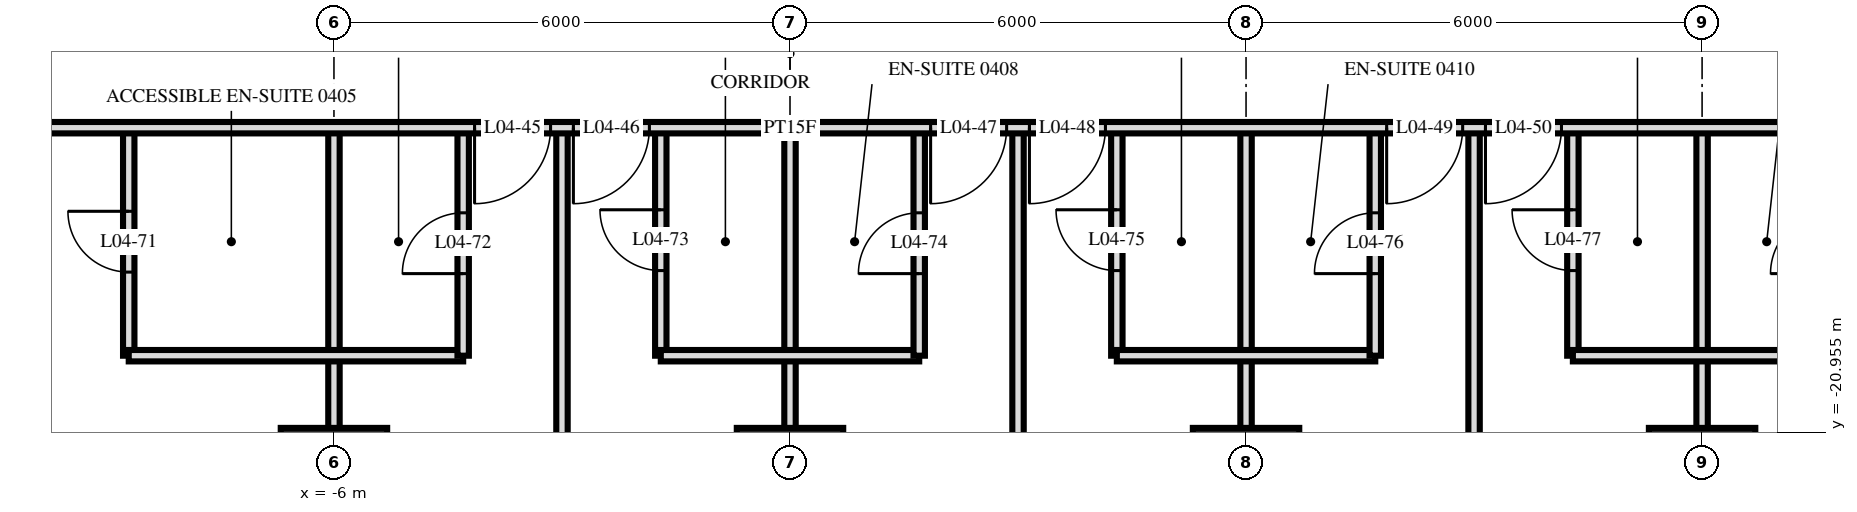
"""IFC4 building model, lengths in metres.
Left out: names, types, materials, properties, quantities, classifications, styles, units other than length and angle.
Written with IfcOpenShell. Run it as: python <this file> out.ifc"""

import sys

from ifc_helpers import new_model, si_unit, direction, frame, frame_2d, origin, origin_2d, place, context, subcontext, project, spatial, rectangle, extrude, element, fill, save


model = new_model("IFC4")
c1 = context("Model", 3, precision=1e-05, world=origin(), true_north=direction((0.0, 1.0)))
c2 = subcontext(c1, "Body", "Model", "MODEL_VIEW")
j1 = project(units=[si_unit("LENGTHUNIT", "METRE"), si_unit("PLANEANGLEUNIT", "RADIAN")], contexts=[c1])
p1 = place(None, origin())
s1 = spatial("IfcSite", under=j1, at=p1, CompositionType="ELEMENT")
p2 = place(p1, origin())
s2 = spatial("IfcBuilding", under=s1, at=p2, CompositionType="ELEMENT")
p3 = place(p2, frame((0.0, 0.0, 24.0)))
s3 = spatial("IfcBuildingStorey", under=s2, at=p3, CompositionType="ELEMENT", Elevation=24.0)
for number, where, z_axis, x_axis in (
    (1, (-6.0, -21.6, -0.28), (0.0, 0.0, 1.0), (1.0, 0.0, 0.0)),
    (2, (0.0, -21.6, -0.28), (0.0, 0.0, 1.0), (1.0, 0.0, 0.0)),
    (3, (6.0, -21.6, -0.28), (0.0, 0.0, 1.0), (1.0, 0.0, 0.0)),
    (4, (12.0, -21.6, -0.28), (0.0, 0.0, 1.0), (1.0, 0.0, 0.0)),
):
    element("IfcColumn", number, at=place(p3, frame(where, z_axis=z_axis, x_axis=x_axis)), inside=s3, PredefinedType="COLUMN", context=c2, shape_type="SweptSolid", body=[
        extrude(rectangle(XDim=1.4, YDim=1.4, at=origin_2d()), origin(), (0.0, 0.0, 1.0), 3.88),
    ])
p4 = place(p3, frame((12.0, -29.22, 0.0), z_axis=(0.0, 0.0, 1.0), x_axis=(0.0, 1.0, 0.0)))
e5 = element("IfcWall", 5, at=p4, inside=s3, PredefinedType="PARTITIONING", context=c2, shape_type="SweptSolid", body=[
    extrude(rectangle(XDim=12.27, YDim=0.15, at=frame_2d((6.135, 0.0))), origin(), (0.0, 0.0, 1.0), 3.32),
])
p5 = place(p3, frame((10.3, -19.95, 0.0), z_axis=(0.0, 0.0, 1.0), x_axis=(0.0, 1.0, 0.0)))
e6 = element("IfcWall", 6, at=p5, inside=s3, PredefinedType="PARTITIONING", context=c2, shape_type="SweptSolid", body=[
    extrude(rectangle(XDim=3.0, YDim=0.15, at=frame_2d((1.5, 0.0))), origin(), (0.0, 0.0, 1.0), 3.32),
])
p6 = place(p5, frame((1.12, 0.0, 0.0)))
e7 = element("IfcOpeningElement", 7, at=p6, cuts=e6, PredefinedType="OPENING", context=c2, shape_type="SweptSolid", body=[
    extrude(rectangle(XDim=0.8, YDim=2.1, at=frame_2d((0.4, 1.05))), frame((0.0, 0.085, 0.0), z_axis=(0.0, -1.0, 0.0), x_axis=(1.0, 0.0, 0.0)), (0.0, 0.0, 1.0), 0.17),
])
p7 = place(p3, frame((9.0, -29.22, 0.0), z_axis=(0.0, 0.0, 1.0), x_axis=(0.0, 1.0, 0.0)))
e8 = element("IfcWall", 8, at=p7, inside=s3, PredefinedType="PARTITIONING", context=c2, shape_type="SweptSolid", body=[
    extrude(rectangle(XDim=12.27, YDim=0.15, at=frame_2d((6.135, 0.0))), origin(), (0.0, 0.0, 1.0), 3.32),
])
p8 = place(p3, frame((7.7, -19.95, 0.0), z_axis=(0.0, 0.0, 1.0), x_axis=(0.0, 1.0, 0.0)))
e9 = element("IfcWall", 9, at=p8, inside=s3, PredefinedType="PARTITIONING", context=c2, shape_type="SweptSolid", body=[
    extrude(rectangle(XDim=3.0, YDim=0.15, at=frame_2d((1.5, 0.0))), origin(), (0.0, 0.0, 1.0), 3.32),
])
p9 = place(p8, frame((1.08, 0.0, 0.0)))
e10 = element("IfcOpeningElement", 10, at=p9, cuts=e9, PredefinedType="OPENING", context=c2, shape_type="SweptSolid", body=[
    extrude(rectangle(XDim=0.8, YDim=2.1, at=frame_2d((0.4, 1.05))), frame((0.0, 0.085, 0.0), z_axis=(0.0, -1.0, 0.0), x_axis=(1.0, 0.0, 0.0)), (0.0, 0.0, 1.0), 0.17),
])
p10 = place(p3, frame((6.0, -29.22, 0.0), z_axis=(0.0, 0.0, 1.0), x_axis=(0.0, 1.0, 0.0)))
e11 = element("IfcWall", 11, at=p10, inside=s3, PredefinedType="PARTITIONING", context=c2, shape_type="SweptSolid", body=[
    extrude(rectangle(XDim=12.27, YDim=0.15, at=frame_2d((6.135, 0.0))), origin(), (0.0, 0.0, 1.0), 3.32),
])
p11 = place(p3, frame((4.3, -19.95, 0.0), z_axis=(0.0, 0.0, 1.0), x_axis=(0.0, 1.0, 0.0)))
e12 = element("IfcWall", 12, at=p11, inside=s3, PredefinedType="PARTITIONING", context=c2, shape_type="SweptSolid", body=[
    extrude(rectangle(XDim=3.0, YDim=0.15, at=frame_2d((1.5, 0.0))), origin(), (0.0, 0.0, 1.0), 3.32),
])
p12 = place(p11, frame((1.12, 0.0, 0.0)))
e13 = element("IfcOpeningElement", 13, at=p12, cuts=e12, PredefinedType="OPENING", context=c2, shape_type="SweptSolid", body=[
    extrude(rectangle(XDim=0.8, YDim=2.1, at=frame_2d((0.4, 1.05))), frame((0.0, 0.085, 0.0), z_axis=(0.0, -1.0, 0.0), x_axis=(1.0, 0.0, 0.0)), (0.0, 0.0, 1.0), 0.17),
])
p13 = place(p3, frame((3.0, -29.22, 0.0), z_axis=(0.0, 0.0, 1.0), x_axis=(0.0, 1.0, 0.0)))
e14 = element("IfcWall", 14, at=p13, inside=s3, PredefinedType="PARTITIONING", context=c2, shape_type="SweptSolid", body=[
    extrude(rectangle(XDim=12.27, YDim=0.15, at=frame_2d((6.135, 0.0))), origin(), (0.0, 0.0, 1.0), 3.32),
])
p14 = place(p3, frame((1.7, -19.95, 0.0), z_axis=(0.0, 0.0, 1.0), x_axis=(0.0, 1.0, 0.0)))
e15 = element("IfcWall", 15, at=p14, inside=s3, PredefinedType="PARTITIONING", context=c2, shape_type="SweptSolid", body=[
    extrude(rectangle(XDim=3.0, YDim=0.15, at=frame_2d((1.5, 0.0))), origin(), (0.0, 0.0, 1.0), 3.32),
])
p15 = place(p14, frame((1.08, 0.0, 0.0)))
e16 = element("IfcOpeningElement", 16, at=p15, cuts=e15, PredefinedType="OPENING", context=c2, shape_type="SweptSolid", body=[
    extrude(rectangle(XDim=0.8, YDim=2.1, at=frame_2d((0.4, 1.05))), frame((0.0, 0.085, 0.0), z_axis=(0.0, -1.0, 0.0), x_axis=(1.0, 0.0, 0.0)), (0.0, 0.0, 1.0), 0.17),
])
p16 = place(p3, frame((0.0, -29.22, 0.0), z_axis=(0.0, 0.0, 1.0), x_axis=(0.0, 1.0, 0.0)))
e17 = element("IfcWall", 17, at=p16, inside=s3, PredefinedType="PARTITIONING", context=c2, shape_type="SweptSolid", body=[
    extrude(rectangle(XDim=12.27, YDim=0.15, at=frame_2d((6.135, 0.0))), origin(), (0.0, 0.0, 1.0), 3.32),
])
p17 = place(p3, frame((-1.7, -19.95, 0.0), z_axis=(0.0, 0.0, 1.0), x_axis=(0.0, 1.0, 0.0)))
e18 = element("IfcWall", 18, at=p17, inside=s3, PredefinedType="PARTITIONING", context=c2, shape_type="SweptSolid", body=[
    extrude(rectangle(XDim=3.0, YDim=0.15, at=frame_2d((1.5, 0.0))), origin(), (0.0, 0.0, 1.0), 3.32),
])
p18 = place(p17, frame((1.12, 0.0, 0.0)))
e19 = element("IfcOpeningElement", 19, at=p18, cuts=e18, PredefinedType="OPENING", context=c2, shape_type="SweptSolid", body=[
    extrude(rectangle(XDim=0.8, YDim=2.1, at=frame_2d((0.4, 1.05))), frame((0.0, 0.085, 0.0), z_axis=(0.0, -1.0, 0.0), x_axis=(1.0, 0.0, 0.0)), (0.0, 0.0, 1.0), 0.17),
])
p19 = place(p3, frame((-3.0, -29.22, 0.0), z_axis=(0.0, 0.0, 1.0), x_axis=(0.0, 1.0, 0.0)))
e20 = element("IfcWall", 20, at=p19, inside=s3, PredefinedType="PARTITIONING", context=c2, shape_type="SweptSolid", body=[
    extrude(rectangle(XDim=12.27, YDim=0.15, at=frame_2d((6.135, 0.0))), origin(), (0.0, 0.0, 1.0), 3.32),
])
p20 = place(p3, frame((-4.3, -19.95, 0.0), z_axis=(0.0, 0.0, 1.0), x_axis=(0.0, 1.0, 0.0)))
e21 = element("IfcWall", 21, at=p20, inside=s3, PredefinedType="PARTITIONING", context=c2, shape_type="SweptSolid", body=[
    extrude(rectangle(XDim=3.0, YDim=0.15, at=frame_2d((1.5, 0.0))), origin(), (0.0, 0.0, 1.0), 3.32),
])
p21 = place(p20, frame((1.08, 0.0, 0.0)))
e22 = element("IfcOpeningElement", 22, at=p21, cuts=e21, PredefinedType="OPENING", context=c2, shape_type="SweptSolid", body=[
    extrude(rectangle(XDim=0.8, YDim=2.1, at=frame_2d((0.4, 1.05))), frame((0.0, 0.085, 0.0), z_axis=(0.0, -1.0, 0.0), x_axis=(1.0, 0.0, 0.0)), (0.0, 0.0, 1.0), 0.17),
])
p22 = place(p3, frame((-6.0, -29.22, 0.0), z_axis=(0.0, 0.0, 1.0), x_axis=(0.0, 1.0, 0.0)))
e23 = element("IfcWall", 23, at=p22, inside=s3, PredefinedType="PARTITIONING", context=c2, shape_type="SweptSolid", body=[
    extrude(rectangle(XDim=12.27, YDim=0.15, at=frame_2d((6.135, 0.0))), origin(), (0.0, 0.0, 1.0), 3.32),
])
p23 = place(p3, frame((-8.7, -19.95, 0.0), z_axis=(0.0, 0.0, 1.0), x_axis=(0.0, 1.0, 0.0)))
e24 = element("IfcWall", 24, at=p23, inside=s3, PredefinedType="PARTITIONING", context=c2, shape_type="SweptSolid", body=[
    extrude(rectangle(XDim=3.0, YDim=0.15, at=frame_2d((1.5, 0.0))), origin(), (0.0, 0.0, 1.0), 3.32),
])
p24 = place(p23, frame((1.1, 0.0, 0.0)))
e25 = element("IfcOpeningElement", 25, at=p24, cuts=e24, PredefinedType="OPENING", context=c2, shape_type="SweptSolid", body=[
    extrude(rectangle(XDim=0.8, YDim=2.1, at=frame_2d((0.4, 1.05))), frame((0.0, 0.085, 0.0), z_axis=(0.0, -1.0, 0.0), x_axis=(1.0, 0.0, 0.0)), (0.0, 0.0, 1.0), 0.17),
])
p25 = place(p3, frame((-8.7, -19.95, 0.0), z_axis=(0.0, 0.0, 1.0), x_axis=(1.0, 0.0, 0.0)))
e26 = element("IfcWall", 26, at=p25, inside=s3, PredefinedType="PARTITIONING", context=c2, shape_type="SweptSolid", body=[
    extrude(rectangle(XDim=4.4, YDim=0.15, at=frame_2d((2.2, 0.0))), origin(), (0.0, 0.0, 1.0), 3.32),
])
for number, where, z_axis, x_axis in (
    (27, (-1.7, -19.95, 0.0), (0.0, 0.0, 1.0), (1.0, 0.0, 0.0)),
    (28, (4.3, -19.95, 0.0), (0.0, 0.0, 1.0), (1.0, 0.0, 0.0)),
    (29, (10.3, -19.95, 0.0), (0.0, 0.0, 1.0), (1.0, 0.0, 0.0)),
):
    element("IfcWall", number, at=place(p3, frame(where, z_axis=z_axis, x_axis=x_axis)), inside=s3, PredefinedType="PARTITIONING", context=c2, shape_type="SweptSolid", body=[
        extrude(rectangle(XDim=3.4, YDim=0.15, at=frame_2d((1.7, 0.0))), origin(), (0.0, 0.0, 1.0), 3.32),
    ])
p26 = place(p3, frame((-33.12, -16.95, 0.0), z_axis=(0.0, 0.0, 1.0), x_axis=(1.0, 0.0, 0.0)))
e30 = element("IfcWall", 30, at=p26, inside=s3, PredefinedType="PARTITIONING", context=c2, shape_type="SweptSolid", body=[
    extrude(rectangle(XDim=66.24, YDim=0.15, at=frame_2d((33.12, 0.0))), origin(), (0.0, 0.0, 1.0), 3.32),
])
p27 = place(p26, frame((9.27, 0.0, 0.0)))
e31 = element("IfcOpeningElement", 31, at=p27, cuts=e30, PredefinedType="OPENING", context=c2, shape_type="SweptSolid", body=[
    extrude(rectangle(XDim=1.0, YDim=2.1, at=frame_2d((0.5, 1.05))), frame((0.0, 0.085, 0.0), z_axis=(0.0, -1.0, 0.0), x_axis=(1.0, 0.0, 0.0)), (0.0, 0.0, 1.0), 0.17),
])
p28 = place(p26, frame((13.97, 0.0, 0.0)))
e32 = element("IfcOpeningElement", 32, at=p28, cuts=e30, PredefinedType="OPENING", context=c2, shape_type="SweptSolid", body=[
    extrude(rectangle(XDim=1.0, YDim=2.1, at=frame_2d((0.5, 1.05))), frame((0.0, 0.085, 0.0), z_axis=(0.0, -1.0, 0.0), x_axis=(1.0, 0.0, 0.0)), (0.0, 0.0, 1.0), 0.17),
])
p29 = place(p26, frame((15.27, 0.0, 0.0)))
e33 = element("IfcOpeningElement", 33, at=p29, cuts=e30, PredefinedType="OPENING", context=c2, shape_type="SweptSolid", body=[
    extrude(rectangle(XDim=1.0, YDim=2.1, at=frame_2d((0.5, 1.05))), frame((0.0, 0.085, 0.0), z_axis=(0.0, -1.0, 0.0), x_axis=(1.0, 0.0, 0.0)), (0.0, 0.0, 1.0), 0.17),
])
p30 = place(p26, frame((19.97, 0.0, 0.0)))
e34 = element("IfcOpeningElement", 34, at=p30, cuts=e30, PredefinedType="OPENING", context=c2, shape_type="SweptSolid", body=[
    extrude(rectangle(XDim=1.0, YDim=2.1, at=frame_2d((0.5, 1.05))), frame((0.0, 0.085, 0.0), z_axis=(0.0, -1.0, 0.0), x_axis=(1.0, 0.0, 0.0)), (0.0, 0.0, 1.0), 0.17),
])
p31 = place(p26, frame((22.27, 0.0, 0.0)))
e35 = element("IfcOpeningElement", 35, at=p31, cuts=e30, PredefinedType="OPENING", context=c2, shape_type="SweptSolid", body=[
    extrude(rectangle(XDim=1.0, YDim=2.1, at=frame_2d((0.5, 1.05))), frame((0.0, 0.085, 0.0), z_axis=(0.0, -1.0, 0.0), x_axis=(1.0, 0.0, 0.0)), (0.0, 0.0, 1.0), 0.17),
])
p32 = place(p26, frame((28.97, 0.0, 0.0)))
e36 = element("IfcOpeningElement", 36, at=p32, cuts=e30, PredefinedType="OPENING", context=c2, shape_type="SweptSolid", body=[
    extrude(rectangle(XDim=1.0, YDim=2.1, at=frame_2d((0.5, 1.05))), frame((0.0, 0.085, 0.0), z_axis=(0.0, -1.0, 0.0), x_axis=(1.0, 0.0, 0.0)), (0.0, 0.0, 1.0), 0.17),
])
p33 = place(p26, frame((30.27, 0.0, 0.0)))
e37 = element("IfcOpeningElement", 37, at=p33, cuts=e30, PredefinedType="OPENING", context=c2, shape_type="SweptSolid", body=[
    extrude(rectangle(XDim=1.0, YDim=2.1, at=frame_2d((0.5, 1.05))), frame((0.0, 0.085, 0.0), z_axis=(0.0, -1.0, 0.0), x_axis=(1.0, 0.0, 0.0)), (0.0, 0.0, 1.0), 0.17),
])
p34 = place(p26, frame((34.97, 0.0, 0.0)))
e38 = element("IfcOpeningElement", 38, at=p34, cuts=e30, PredefinedType="OPENING", context=c2, shape_type="SweptSolid", body=[
    extrude(rectangle(XDim=1.0, YDim=2.1, at=frame_2d((0.5, 1.05))), frame((0.0, 0.085, 0.0), z_axis=(0.0, -1.0, 0.0), x_axis=(1.0, 0.0, 0.0)), (0.0, 0.0, 1.0), 0.17),
])
p35 = place(p26, frame((36.27, 0.0, 0.0)))
e39 = element("IfcOpeningElement", 39, at=p35, cuts=e30, PredefinedType="OPENING", context=c2, shape_type="SweptSolid", body=[
    extrude(rectangle(XDim=1.0, YDim=2.1, at=frame_2d((0.5, 1.05))), frame((0.0, 0.085, 0.0), z_axis=(0.0, -1.0, 0.0), x_axis=(1.0, 0.0, 0.0)), (0.0, 0.0, 1.0), 0.17),
])
p36 = place(p26, frame((40.97, 0.0, 0.0)))
e40 = element("IfcOpeningElement", 40, at=p36, cuts=e30, PredefinedType="OPENING", context=c2, shape_type="SweptSolid", body=[
    extrude(rectangle(XDim=1.0, YDim=2.1, at=frame_2d((0.5, 1.05))), frame((0.0, 0.085, 0.0), z_axis=(0.0, -1.0, 0.0), x_axis=(1.0, 0.0, 0.0)), (0.0, 0.0, 1.0), 0.17),
])
p37 = place(p26, frame((42.27, 0.0, 0.0)))
e41 = element("IfcOpeningElement", 41, at=p37, cuts=e30, PredefinedType="OPENING", context=c2, shape_type="SweptSolid", body=[
    extrude(rectangle(XDim=1.0, YDim=2.1, at=frame_2d((0.5, 1.05))), frame((0.0, 0.085, 0.0), z_axis=(0.0, -1.0, 0.0), x_axis=(1.0, 0.0, 0.0)), (0.0, 0.0, 1.0), 0.17),
])
p38 = place(p26, frame((46.97, 0.0, 0.0)))
e42 = element("IfcOpeningElement", 42, at=p38, cuts=e30, PredefinedType="OPENING", context=c2, shape_type="SweptSolid", body=[
    extrude(rectangle(XDim=1.0, YDim=2.1, at=frame_2d((0.5, 1.05))), frame((0.0, 0.085, 0.0), z_axis=(0.0, -1.0, 0.0), x_axis=(1.0, 0.0, 0.0)), (0.0, 0.0, 1.0), 0.17),
])
p39 = place(p26, frame((48.27, 0.0, 0.0)))
e43 = element("IfcOpeningElement", 43, at=p39, cuts=e30, PredefinedType="OPENING", context=c2, shape_type="SweptSolid", body=[
    extrude(rectangle(XDim=1.0, YDim=2.1, at=frame_2d((0.5, 1.05))), frame((0.0, 0.085, 0.0), z_axis=(0.0, -1.0, 0.0), x_axis=(1.0, 0.0, 0.0)), (0.0, 0.0, 1.0), 0.17),
])
p40 = place(p26, frame((52.97, 0.0, 0.0)))
e44 = element("IfcOpeningElement", 44, at=p40, cuts=e30, PredefinedType="OPENING", context=c2, shape_type="SweptSolid", body=[
    extrude(rectangle(XDim=1.0, YDim=2.1, at=frame_2d((0.5, 1.05))), frame((0.0, 0.085, 0.0), z_axis=(0.0, -1.0, 0.0), x_axis=(1.0, 0.0, 0.0)), (0.0, 0.0, 1.0), 0.17),
])
p41 = place(p26, frame((54.27, 0.0, 0.0)))
e45 = element("IfcOpeningElement", 45, at=p41, cuts=e30, PredefinedType="OPENING", context=c2, shape_type="SweptSolid", body=[
    extrude(rectangle(XDim=1.0, YDim=2.1, at=frame_2d((0.5, 1.05))), frame((0.0, 0.085, 0.0), z_axis=(0.0, -1.0, 0.0), x_axis=(1.0, 0.0, 0.0)), (0.0, 0.0, 1.0), 0.17),
])
p42 = place(p26, frame((4.4, 0.0, 0.0)))
e46 = element("IfcOpeningElement", 46, at=p42, cuts=e30, PredefinedType="OPENING", context=c2, shape_type="SweptSolid", body=[
    extrude(rectangle(XDim=1.0, YDim=2.1, at=frame_2d((0.5, 1.05))), frame((0.0, 0.085, 0.0), z_axis=(0.0, -1.0, 0.0), x_axis=(1.0, 0.0, 0.0)), (0.0, 0.0, 1.0), 0.17),
])
p43 = place(p26, frame((60.8, 0.0, 0.0)))
e47 = element("IfcOpeningElement", 47, at=p43, cuts=e30, PredefinedType="OPENING", context=c2, shape_type="SweptSolid", body=[
    extrude(rectangle(XDim=1.0, YDim=2.1, at=frame_2d((0.5, 1.05))), frame((0.0, 0.085, 0.0), z_axis=(0.0, -1.0, 0.0), x_axis=(1.0, 0.0, 0.0)), (0.0, 0.0, 1.0), 0.17),
])
p44 = place(p32, frame((0.5, 0.0, 0.0), z_axis=(0.0, 0.0, 1.0), x_axis=(-1.0, 0.0, 0.0)))
e48 = element("IfcDoor", 48, at=p44, inside=s3, OperationType="SINGLE_SWING_LEFT", PredefinedType="DOOR", context=c2, shape_type="SweptSolid", body=[
    extrude(rectangle(XDim=1.0, YDim=2.1, at=frame_2d((0.0, 1.05))), frame((0.0, -0.025, 0.0), z_axis=(0.0, 1.0, 0.0), x_axis=(-1.0, 0.0, 0.0)), (0.0, 0.0, 1.0), 0.05),
])
fill(e36, e48)
p45 = place(p33, frame((0.5, 0.0, 0.0), z_axis=(0.0, 0.0, 1.0), x_axis=(-1.0, 0.0, 0.0)))
e49 = element("IfcDoor", 49, at=p45, inside=s3, OperationType="SINGLE_SWING_LEFT", PredefinedType="DOOR", context=c2, shape_type="SweptSolid", body=[
    extrude(rectangle(XDim=1.0, YDim=2.1, at=frame_2d((0.0, 1.05))), frame((0.0, -0.025, 0.0), z_axis=(0.0, 1.0, 0.0), x_axis=(-1.0, 0.0, 0.0)), (0.0, 0.0, 1.0), 0.05),
])
fill(e37, e49)
p46 = place(p34, frame((0.5, 0.0, 0.0), z_axis=(0.0, 0.0, 1.0), x_axis=(-1.0, 0.0, 0.0)))
e50 = element("IfcDoor", 50, at=p46, inside=s3, OperationType="SINGLE_SWING_LEFT", PredefinedType="DOOR", context=c2, shape_type="SweptSolid", body=[
    extrude(rectangle(XDim=1.0, YDim=2.1, at=frame_2d((0.0, 1.05))), frame((0.0, -0.025, 0.0), z_axis=(0.0, 1.0, 0.0), x_axis=(-1.0, 0.0, 0.0)), (0.0, 0.0, 1.0), 0.05),
])
fill(e38, e50)
p47 = place(p35, frame((0.5, 0.0, 0.0), z_axis=(0.0, 0.0, 1.0), x_axis=(-1.0, 0.0, 0.0)))
e51 = element("IfcDoor", 51, at=p47, inside=s3, OperationType="SINGLE_SWING_LEFT", PredefinedType="DOOR", context=c2, shape_type="SweptSolid", body=[
    extrude(rectangle(XDim=1.0, YDim=2.1, at=frame_2d((0.0, 1.05))), frame((0.0, -0.025, 0.0), z_axis=(0.0, 1.0, 0.0), x_axis=(-1.0, 0.0, 0.0)), (0.0, 0.0, 1.0), 0.05),
])
fill(e39, e51)
p48 = place(p36, frame((0.5, 0.0, 0.0), z_axis=(0.0, 0.0, 1.0), x_axis=(-1.0, 0.0, 0.0)))
e52 = element("IfcDoor", 52, at=p48, inside=s3, OperationType="SINGLE_SWING_LEFT", PredefinedType="DOOR", context=c2, shape_type="SweptSolid", body=[
    extrude(rectangle(XDim=1.0, YDim=2.1, at=frame_2d((0.0, 1.05))), frame((0.0, -0.025, 0.0), z_axis=(0.0, 1.0, 0.0), x_axis=(-1.0, 0.0, 0.0)), (0.0, 0.0, 1.0), 0.05),
])
fill(e40, e52)
p49 = place(p37, frame((0.5, 0.0, 0.0), z_axis=(0.0, 0.0, 1.0), x_axis=(-1.0, 0.0, 0.0)))
e53 = element("IfcDoor", 53, at=p49, inside=s3, OperationType="SINGLE_SWING_LEFT", PredefinedType="DOOR", context=c2, shape_type="SweptSolid", body=[
    extrude(rectangle(XDim=1.0, YDim=2.1, at=frame_2d((0.0, 1.05))), frame((0.0, -0.025, 0.0), z_axis=(0.0, 1.0, 0.0), x_axis=(-1.0, 0.0, 0.0)), (0.0, 0.0, 1.0), 0.05),
])
fill(e41, e53)
p50 = place(p24, origin())
e54 = element("IfcDoor", 54, at=p50, inside=s3, OperationType="SINGLE_SWING_LEFT", PredefinedType="DOOR", context=c2, shape_type="SweptSolid", body=[
    extrude(rectangle(XDim=0.8, YDim=2.1, at=frame_2d((0.4, 1.05))), frame((0.0, 0.025, 0.0), z_axis=(0.0, -1.0, 0.0), x_axis=(1.0, 0.0, 0.0)), (0.0, 0.0, 1.0), 0.05),
])
fill(e25, e54)
p51 = place(p21, origin())
e55 = element("IfcDoor", 55, at=p51, inside=s3, OperationType="SINGLE_SWING_RIGHT", PredefinedType="DOOR", context=c2, shape_type="SweptSolid", body=[
    extrude(rectangle(XDim=0.8, YDim=2.1, at=frame_2d((0.4, 1.05))), frame((0.0, 0.025, 0.0), z_axis=(0.0, -1.0, 0.0), x_axis=(1.0, 0.0, 0.0)), (0.0, 0.0, 1.0), 0.05),
])
fill(e22, e55)
p52 = place(p18, origin())
e56 = element("IfcDoor", 56, at=p52, inside=s3, OperationType="SINGLE_SWING_LEFT", PredefinedType="DOOR", context=c2, shape_type="SweptSolid", body=[
    extrude(rectangle(XDim=0.8, YDim=2.1, at=frame_2d((0.4, 1.05))), frame((0.0, 0.025, 0.0), z_axis=(0.0, -1.0, 0.0), x_axis=(1.0, 0.0, 0.0)), (0.0, 0.0, 1.0), 0.05),
])
fill(e19, e56)
p53 = place(p15, origin())
e57 = element("IfcDoor", 57, at=p53, inside=s3, OperationType="SINGLE_SWING_RIGHT", PredefinedType="DOOR", context=c2, shape_type="SweptSolid", body=[
    extrude(rectangle(XDim=0.8, YDim=2.1, at=frame_2d((0.4, 1.05))), frame((0.0, 0.025, 0.0), z_axis=(0.0, -1.0, 0.0), x_axis=(1.0, 0.0, 0.0)), (0.0, 0.0, 1.0), 0.05),
])
fill(e16, e57)
p54 = place(p12, origin())
e58 = element("IfcDoor", 58, at=p54, inside=s3, OperationType="SINGLE_SWING_LEFT", PredefinedType="DOOR", context=c2, shape_type="SweptSolid", body=[
    extrude(rectangle(XDim=0.8, YDim=2.1, at=frame_2d((0.4, 1.05))), frame((0.0, 0.025, 0.0), z_axis=(0.0, -1.0, 0.0), x_axis=(1.0, 0.0, 0.0)), (0.0, 0.0, 1.0), 0.05),
])
fill(e13, e58)
p55 = place(p9, origin())
e59 = element("IfcDoor", 59, at=p55, inside=s3, OperationType="SINGLE_SWING_RIGHT", PredefinedType="DOOR", context=c2, shape_type="SweptSolid", body=[
    extrude(rectangle(XDim=0.8, YDim=2.1, at=frame_2d((0.4, 1.05))), frame((0.0, 0.025, 0.0), z_axis=(0.0, -1.0, 0.0), x_axis=(1.0, 0.0, 0.0)), (0.0, 0.0, 1.0), 0.05),
])
fill(e10, e59)
p56 = place(p6, origin())
e60 = element("IfcDoor", 60, at=p56, inside=s3, OperationType="SINGLE_SWING_LEFT", PredefinedType="DOOR", context=c2, shape_type="SweptSolid", body=[
    extrude(rectangle(XDim=0.8, YDim=2.1, at=frame_2d((0.4, 1.05))), frame((0.0, 0.025, 0.0), z_axis=(0.0, -1.0, 0.0), x_axis=(1.0, 0.0, 0.0)), (0.0, 0.0, 1.0), 0.05),
])
fill(e7, e60)
save(model, sys.argv[1])
